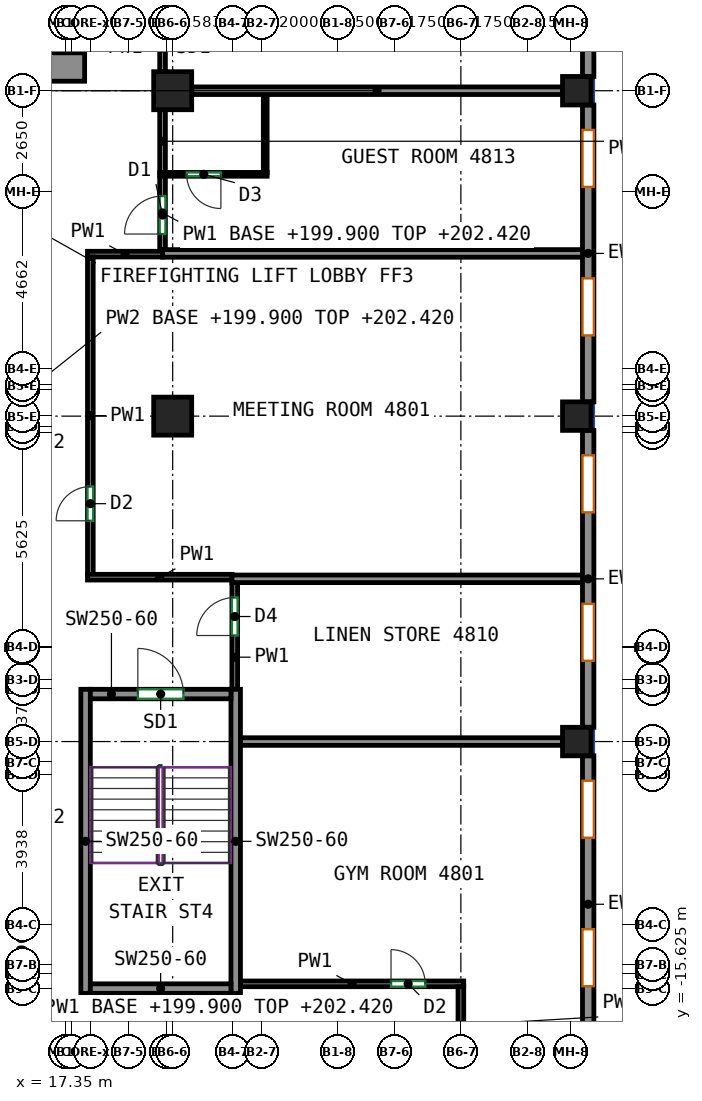
"""IFC4 building model, lengths in metres.
Left out: names, types, materials, properties, quantities, classifications, styles, units other than length and angle.
Written with IfcOpenShell. Run it as: python <this file> out.ifc"""

import sys

from ifc_helpers import new_model, si_unit, direction, frame, frame_2d, origin, origin_2d, place, context, subcontext, project, spatial, rectangle, extrude, source, transform, mapped, element, fill, save


model = new_model("IFC4")
c1 = context("Model", 3, precision=1e-05, world=origin(), true_north=direction((0.0, 1.0)))
c2 = subcontext(c1, "Body", "Model", "MODEL_VIEW")
j1 = project(units=[si_unit("LENGTHUNIT", "METRE"), si_unit("PLANEANGLEUNIT", "RADIAN")], contexts=[c1])
p1 = place(None, origin())
s1 = spatial("IfcSite", under=j1, at=p1, CompositionType="ELEMENT")
p2 = place(p1, origin())
s2 = spatial("IfcBuilding", under=s1, at=p2, CompositionType="ELEMENT")
p3 = place(p2, frame((0.0, 0.0, 199.9)))
s3 = spatial("IfcBuildingStorey", under=s2, at=p3, CompositionType="ELEMENT", Elevation=199.9)
m1 = source(origin(), c2, "Body", "SweptSolid", [
    extrude(rectangle(XDim=1.0, YDim=1.0, at=origin_2d()), origin(), (0.0, 0.0, 1.0), 3.12),
])
for number, where, z_axis, x_axis in (
    (1, (20.167, -0.562, 0.0), (0.0, 0.0, 1.0), (1.0, 0.0, 0.0)),
    (2, (20.167, 8.0, 0.0), (0.0, 0.0, 1.0), (1.0, 0.0, 0.0)),
):
    element("IfcColumn", number, at=place(p3, frame(where, z_axis=z_axis, x_axis=x_axis)), inside=s3, PredefinedType="COLUMN", context=c2, shape_type="MappedRepresentation", body=[
        mapped(m1, transform((0.0, 0.0, 0.0))),
    ])
m2 = source(origin(), c2, "Body", "SweptSolid", [
    extrude(rectangle(XDim=0.75, YDim=0.75, at=origin_2d()), origin(), (0.0, 0.0, 1.0), 3.12),
])
for number, where, z_axis, x_axis in (
    (3, (30.8, -9.125, 0.0), (0.0, 0.0, 1.0), (1.0, 0.0, 0.0)),
    (4, (30.8, -0.562, 0.0), (0.0, 0.0, 1.0), (1.0, 0.0, 0.0)),
    (5, (30.8, 8.0, 0.0), (0.0, 0.0, 1.0), (1.0, 0.0, 0.0)),
):
    element("IfcColumn", number, at=place(p3, frame(where, z_axis=z_axis, x_axis=x_axis)), inside=s3, PredefinedType="COLUMN", context=c2, shape_type="MappedRepresentation", body=[
        mapped(m2, transform((0.0, 0.0, 0.0))),
    ])
m3 = source(origin(), c2, "Body", "SweptSolid", [
    extrude(rectangle(XDim=5.38, YDim=0.75, at=frame_2d((2.69, 0.0))), origin(), (0.0, 0.0, 1.0), 3.12),
])
p4 = place(p3, frame((12.47, 8.625, 0.0), z_axis=(0.0, 0.0, 1.0), x_axis=(1.0, 0.0, 0.0)))
e6 = element("IfcWall", 6, at=p4, inside=s3, PredefinedType="SHEAR", context=c2, shape_type="MappedRepresentation", body=[
    mapped(m3, transform((0.0, 0.0, 0.0))),
])
p5 = place(p4, frame((2.18, 0.0, 0.0)))
e7 = element("IfcOpeningElement", 7, at=p5, cuts=e6, PredefinedType="OPENING", context=c2, shape_type="SweptSolid", body=[
    extrude(rectangle(XDim=1.2, YDim=2.1, at=frame_2d((0.6, 1.05))), frame((0.0, 0.385, 0.0), z_axis=(0.0, -1.0, 0.0), x_axis=(1.0, 0.0, 0.0)), (0.0, 0.0, 1.0), 0.77),
])
m4 = source(origin(), c2, "Body", "SweptSolid", [
    extrude(rectangle(XDim=8.0, YDim=0.25, at=frame_2d((4.0, 0.0))), origin(), (0.0, 0.0, 1.0), 3.12),
])
for number, where, z_axis, x_axis in (
    (8, (17.875, -15.75, 0.0), (0.0, 0.0, 1.0), (0.0, 1.0, 0.0)),
    (9, (21.825, -15.75, 0.0), (0.0, 0.0, 1.0), (0.0, 1.0, 0.0)),
):
    element("IfcWall", number, at=place(p3, frame(where, z_axis=z_axis, x_axis=x_axis)), inside=s3, PredefinedType="SHEAR", context=c2, shape_type="MappedRepresentation", body=[
        mapped(m4, transform((0.0, 0.0, 0.0))),
    ])
m5 = source(origin(), c2, "Body", "SweptSolid", [
    extrude(rectangle(XDim=3.7, YDim=0.25, at=frame_2d((1.85, 0.0))), origin(), (0.0, 0.0, 1.0), 3.12),
])
p6 = place(p3, frame((18.0, -15.625, 0.0), z_axis=(0.0, 0.0, 1.0), x_axis=(1.0, 0.0, 0.0)))
e10 = element("IfcWall", 10, at=p6, inside=s3, PredefinedType="SHEAR", context=c2, shape_type="MappedRepresentation", body=[
    mapped(m5, transform((0.0, 0.0, 0.0))),
])
p7 = place(p3, frame((18.0, -7.875, 0.0), z_axis=(0.0, 0.0, 1.0), x_axis=(1.0, 0.0, 0.0)))
e11 = element("IfcWall", 11, at=p7, inside=s3, PredefinedType="SHEAR", context=c2, shape_type="MappedRepresentation", body=[
    mapped(m5, transform((0.0, 0.0, 0.0))),
])
p8 = place(p7, frame((1.25, 0.0, 0.0)))
e12 = element("IfcOpeningElement", 12, at=p8, cuts=e11, PredefinedType="OPENING", context=c2, shape_type="SweptSolid", body=[
    extrude(rectangle(XDim=1.2, YDim=2.1, at=frame_2d((0.6, 1.05))), frame((0.0, 0.135, 0.0), z_axis=(0.0, -1.0, 0.0), x_axis=(1.0, 0.0, 0.0)), (0.0, 0.0, 1.0), 0.27),
])
m6 = source(origin(), c2, "Body", "SweptSolid", [
    extrude(rectangle(XDim=7.812, YDim=0.3, at=frame_2d((3.906, 0.0))), origin(), (0.0, 0.0, 1.0), 3.12),
])
p9 = place(p3, frame((31.1, -17.312, 0.0), z_axis=(0.0, 0.0, 1.0), x_axis=(0.0, 1.0, 0.0)))
e13 = element("IfcWall", 13, at=p9, inside=s3, PredefinedType="SOLIDWALL", context=c2, shape_type="MappedRepresentation", body=[
    mapped(m6, transform((0.0, 0.0, 0.0))),
])
p10 = place(p9, frame((1.75, 0.0, 0.85)))
e14 = element("IfcOpeningElement", 14, at=p10, cuts=e13, PredefinedType="OPENING", context=c2, shape_type="SweptSolid", body=[
    extrude(rectangle(XDim=1.5, YDim=1.95, at=frame_2d((0.75, 0.975))), frame((0.0, 0.16, 0.0), z_axis=(0.0, -1.0, 0.0), x_axis=(1.0, 0.0, 0.0)), (0.0, 0.0, 1.0), 0.32),
])
p11 = place(p9, frame((5.656, 0.0, 0.85)))
e15 = element("IfcOpeningElement", 15, at=p11, cuts=e13, PredefinedType="OPENING", context=c2, shape_type="SweptSolid", body=[
    extrude(rectangle(XDim=1.5, YDim=1.95, at=frame_2d((0.75, 0.975))), frame((0.0, 0.16, 0.0), z_axis=(0.0, -1.0, 0.0), x_axis=(1.0, 0.0, 0.0)), (0.0, 0.0, 1.0), 0.32),
])
p12 = place(p3, frame((31.1, -8.75, 0.0), z_axis=(0.0, 0.0, 1.0), x_axis=(0.0, 1.0, 0.0)))
e16 = element("IfcWall", 16, at=p12, inside=s3, PredefinedType="SOLIDWALL", context=c2, shape_type="MappedRepresentation", body=[
    mapped(m6, transform((0.0, 0.0, 0.0))),
])
p13 = place(p12, frame((1.75, 0.0, 0.85)))
e17 = element("IfcOpeningElement", 17, at=p13, cuts=e16, PredefinedType="OPENING", context=c2, shape_type="SweptSolid", body=[
    extrude(rectangle(XDim=1.5, YDim=1.95, at=frame_2d((0.75, 0.975))), frame((0.0, 0.16, 0.0), z_axis=(0.0, -1.0, 0.0), x_axis=(1.0, 0.0, 0.0)), (0.0, 0.0, 1.0), 0.32),
])
p14 = place(p12, frame((5.656, 0.0, 0.85)))
e18 = element("IfcOpeningElement", 18, at=p14, cuts=e16, PredefinedType="OPENING", context=c2, shape_type="SweptSolid", body=[
    extrude(rectangle(XDim=1.5, YDim=1.95, at=frame_2d((0.75, 0.975))), frame((0.0, 0.16, 0.0), z_axis=(0.0, -1.0, 0.0), x_axis=(1.0, 0.0, 0.0)), (0.0, 0.0, 1.0), 0.32),
])
p15 = place(p3, frame((31.1, -0.188, 0.0), z_axis=(0.0, 0.0, 1.0), x_axis=(0.0, 1.0, 0.0)))
e19 = element("IfcWall", 19, at=p15, inside=s3, PredefinedType="SOLIDWALL", context=c2, shape_type="MappedRepresentation", body=[
    mapped(m6, transform((0.0, 0.0, 0.0))),
])
p16 = place(p15, frame((1.75, 0.0, 0.85)))
e20 = element("IfcOpeningElement", 20, at=p16, cuts=e19, PredefinedType="OPENING", context=c2, shape_type="SweptSolid", body=[
    extrude(rectangle(XDim=1.5, YDim=1.95, at=frame_2d((0.75, 0.975))), frame((0.0, 0.16, 0.0), z_axis=(0.0, -1.0, 0.0), x_axis=(1.0, 0.0, 0.0)), (0.0, 0.0, 1.0), 0.32),
])
p17 = place(p15, frame((5.656, 0.0, 0.85)))
e21 = element("IfcOpeningElement", 21, at=p17, cuts=e19, PredefinedType="OPENING", context=c2, shape_type="SweptSolid", body=[
    extrude(rectangle(XDim=1.5, YDim=1.95, at=frame_2d((0.75, 0.975))), frame((0.0, 0.16, 0.0), z_axis=(0.0, -1.0, 0.0), x_axis=(1.0, 0.0, 0.0)), (0.0, 0.0, 1.0), 0.32),
])
m7 = source(origin(), c2, "Body", "SweptSolid", [
    extrude(rectangle(XDim=14.0, YDim=0.3, at=frame_2d((7.0, 0.0))), origin(), (0.0, 0.0, 1.0), 3.12),
])
p18 = place(p3, frame((31.1, 8.375, 0.0), z_axis=(0.0, 0.0, 1.0), x_axis=(0.0, 1.0, 0.0)))
e22 = element("IfcWall", 22, at=p18, inside=s3, PredefinedType="SOLIDWALL", context=c2, shape_type="MappedRepresentation", body=[
    mapped(m7, transform((0.0, 0.0, 0.0))),
])
p19 = place(p18, frame((1.75, 0.0, 0.85)))
e23 = element("IfcOpeningElement", 23, at=p19, cuts=e22, PredefinedType="OPENING", context=c2, shape_type="SweptSolid", body=[
    extrude(rectangle(XDim=1.5, YDim=1.95, at=frame_2d((0.75, 0.975))), frame((0.0, 0.16, 0.0), z_axis=(0.0, -1.0, 0.0), x_axis=(1.0, 0.0, 0.0)), (0.0, 0.0, 1.0), 0.32),
])
p20 = place(p18, frame((5.25, 0.0, 0.85)))
e24 = element("IfcOpeningElement", 24, at=p20, cuts=e22, PredefinedType="OPENING", context=c2, shape_type="SweptSolid", body=[
    extrude(rectangle(XDim=1.5, YDim=1.95, at=frame_2d((0.75, 0.975))), frame((0.0, 0.16, 0.0), z_axis=(0.0, -1.0, 0.0), x_axis=(1.0, 0.0, 0.0)), (0.0, 0.0, 1.0), 0.32),
])
p21 = place(p18, frame((8.75, 0.0, 0.85)))
e25 = element("IfcOpeningElement", 25, at=p21, cuts=e22, PredefinedType="OPENING", context=c2, shape_type="SweptSolid", body=[
    extrude(rectangle(XDim=1.5, YDim=1.95, at=frame_2d((0.75, 0.975))), frame((0.0, 0.16, 0.0), z_axis=(0.0, -1.0, 0.0), x_axis=(1.0, 0.0, 0.0)), (0.0, 0.0, 1.0), 0.32),
])
p22 = place(p18, frame((12.25, 0.0, 0.85)))
e26 = element("IfcOpeningElement", 26, at=p22, cuts=e22, PredefinedType="OPENING", context=c2, shape_type="SweptSolid", body=[
    extrude(rectangle(XDim=1.5, YDim=1.95, at=frame_2d((0.75, 0.975))), frame((0.0, 0.16, 0.0), z_axis=(0.0, -1.0, 0.0), x_axis=(1.0, 0.0, 0.0)), (0.0, 0.0, 1.0), 0.32),
])
p23 = place(p3, frame((19.9, 3.809, 0.0), z_axis=(0.0, 0.0, 1.0), x_axis=(0.0, 1.0, 0.0)))
e27 = element("IfcWall", 27, at=p23, inside=s3, PredefinedType="PARTITIONING", context=c2, shape_type="SweptSolid", body=[
    extrude(rectangle(XDim=1.951, YDim=0.15, at=frame_2d((0.976, 0.0))), origin(), (0.0, 0.0, 1.0), 2.52),
])
p24 = place(p23, frame((0.42, 0.0, 0.0)))
e28 = element("IfcOpeningElement", 28, at=p24, cuts=e27, PredefinedType="OPENING", context=c2, shape_type="SweptSolid", body=[
    extrude(rectangle(XDim=1.0, YDim=2.1, at=frame_2d((0.5, 1.05))), frame((0.0, 0.085, 0.0), z_axis=(0.0, -1.0, 0.0), x_axis=(1.0, 0.0, 0.0)), (0.0, 0.0, 1.0), 0.17),
])
p25 = place(p3, frame((19.9, 5.84, 0.0), z_axis=(0.0, 0.0, 1.0), x_axis=(0.0, 1.0, 0.0)))
e29 = element("IfcWall", 29, at=p25, inside=s3, PredefinedType="PARTITIONING", context=c2, shape_type="SweptSolid", body=[
    extrude(rectangle(XDim=1.66, YDim=0.15, at=frame_2d((0.83, 0.0))), origin(), (0.0, 0.0, 1.0), 2.52),
])
p26 = place(p3, frame((19.9, 8.5, 0.0), z_axis=(0.0, 0.0, 1.0), x_axis=(0.0, 1.0, 0.0)))
e30 = element("IfcWall", 30, at=p26, inside=s3, PredefinedType="PARTITIONING", context=c2, shape_type="SweptSolid", body=[
    extrude(rectangle(XDim=1.25, YDim=0.15, at=frame_2d((0.625, 0.0))), origin(), (0.0, 0.0, 1.0), 3.12),
])
p27 = place(p3, frame((17.925, 3.7, 0.0), z_axis=(0.0, 0.0, 1.0), x_axis=(1.0, 0.0, 0.0)))
e31 = element("IfcWall", 31, at=p27, inside=s3, PredefinedType="PARTITIONING", context=c2, shape_type="SweptSolid", body=[
    extrude(rectangle(XDim=1.975, YDim=0.15, at=frame_2d((0.987, 0.0))), origin(), (0.0, 0.0, 1.0), 3.12),
])
p28 = place(p3, frame((18.0, -4.725, 0.0), z_axis=(0.0, 0.0, 1.0), x_axis=(0.0, 1.0, 0.0)))
e32 = element("IfcWall", 32, at=p28, inside=s3, PredefinedType="PARTITIONING", context=c2, shape_type="SweptSolid", body=[
    extrude(rectangle(XDim=8.35, YDim=0.15, at=frame_2d((4.175, 0.0))), origin(), (0.0, 0.0, 1.0), 3.12),
])
p29 = place(p28, frame((1.409, 0.0, 0.0)))
e33 = element("IfcOpeningElement", 33, at=p29, cuts=e32, PredefinedType="OPENING", context=c2, shape_type="SweptSolid", body=[
    extrude(rectangle(XDim=0.9, YDim=2.1, at=frame_2d((0.45, 1.05))), frame((0.0, 0.085, 0.0), z_axis=(0.0, -1.0, 0.0), x_axis=(1.0, 0.0, 0.0)), (0.0, 0.0, 1.0), 0.17),
])
p30 = place(p3, frame((17.925, -4.8, 0.0), z_axis=(0.0, 0.0, 1.0), x_axis=(1.0, 0.0, 0.0)))
e34 = element("IfcWall", 34, at=p30, inside=s3, PredefinedType="PARTITIONING", context=c2, shape_type="SweptSolid", body=[
    extrude(rectangle(XDim=3.802, YDim=0.15, at=frame_2d((1.901, 0.0))), origin(), (0.0, 0.0, 1.0), 3.12),
])
p31 = place(p3, frame((21.8, -7.75, 0.0), z_axis=(0.0, 0.0, 1.0), x_axis=(0.0, 1.0, 0.0)))
e35 = element("IfcWall", 35, at=p31, inside=s3, PredefinedType="PARTITIONING", context=c2, shape_type="SweptSolid", body=[
    extrude(rectangle(XDim=2.817, YDim=0.15, at=frame_2d((1.408, 0.0))), origin(), (0.0, 0.0, 1.0), 3.12),
])
p32 = place(p31, frame((1.415, 0.0, 0.0)))
e36 = element("IfcOpeningElement", 36, at=p32, cuts=e35, PredefinedType="OPENING", context=c2, shape_type="SweptSolid", body=[
    extrude(rectangle(XDim=1.0, YDim=2.1, at=frame_2d((0.5, 1.05))), frame((0.0, 0.085, 0.0), z_axis=(0.0, -1.0, 0.0), x_axis=(1.0, 0.0, 0.0)), (0.0, 0.0, 1.0), 0.17),
])
p33 = place(p3, frame((21.95, -15.5, 0.0), z_axis=(0.0, 0.0, 1.0), x_axis=(1.0, 0.0, 0.0)))
e37 = element("IfcWall", 37, at=p33, inside=s3, PredefinedType="PARTITIONING", context=c2, shape_type="SweptSolid", body=[
    extrude(rectangle(XDim=5.875, YDim=0.15, at=frame_2d((2.938, 0.0))), origin(), (0.0, 0.0, 1.0), 3.12),
])
p34 = place(p33, frame((3.962, 0.0, 0.0)))
e38 = element("IfcOpeningElement", 38, at=p34, cuts=e37, PredefinedType="OPENING", context=c2, shape_type="SweptSolid", body=[
    extrude(rectangle(XDim=0.9, YDim=2.1, at=frame_2d((0.45, 1.05))), frame((0.0, 0.085, 0.0), z_axis=(0.0, -1.0, 0.0), x_axis=(1.0, 0.0, 0.0)), (0.0, 0.0, 1.0), 0.17),
])
p35 = place(p3, frame((27.75, -17.598, 0.0), z_axis=(0.0, 0.0, 1.0), x_axis=(0.0, 1.0, 0.0)))
e39 = element("IfcWall", 39, at=p35, inside=s3, PredefinedType="PARTITIONING", context=c2, shape_type="SweptSolid", body=[
    extrude(rectangle(XDim=2.023, YDim=0.15, at=frame_2d((1.011, 0.0))), origin(), (0.0, 0.0, 1.0), 2.52),
])
p36 = place(p3, frame((22.652, 5.8, 0.0), z_axis=(0.0, 0.0, 1.0), x_axis=(-1.0, 0.0, 0.0)))
e40 = element("IfcWall", 40, at=p36, inside=s3, PredefinedType="PARTITIONING", context=c2, shape_type="SweptSolid", body=[
    extrude(rectangle(XDim=2.825, YDim=0.1, at=frame_2d((1.413, 0.0))), origin(), (0.0, 0.0, 1.0), 3.12),
])
p37 = place(p36, frame((1.217, 0.0, 0.0)))
e41 = element("IfcOpeningElement", 41, at=p37, cuts=e40, PredefinedType="OPENING", context=c2, shape_type="SweptSolid", body=[
    extrude(rectangle(XDim=0.9, YDim=2.1, at=frame_2d((0.45, 1.05))), frame((0.0, 0.06, 0.0), z_axis=(0.0, -1.0, 0.0), x_axis=(1.0, 0.0, 0.0)), (0.0, 0.0, 1.0), 0.12),
])
p38 = place(p3, frame((22.602, 5.85, 0.0), z_axis=(0.0, 0.0, 1.0), x_axis=(0.0, 1.0, 0.0)))
e42 = element("IfcWall", 42, at=p38, inside=s3, PredefinedType="PARTITIONING", context=c2, shape_type="SweptSolid", body=[
    extrude(rectangle(XDim=2.05, YDim=0.1, at=frame_2d((1.025, 0.0))), origin(), (0.0, 0.0, 1.0), 3.12),
])
p39 = place(p3, frame((19.902, 3.719, 0.0), z_axis=(0.0, 0.0, 1.0), x_axis=(1.0, 0.0, 0.0)))
e43 = element("IfcWall", 43, at=p39, inside=s3, PredefinedType="PARTITIONING", context=c2, shape_type="SweptSolid", body=[
    extrude(rectangle(XDim=11.098, YDim=0.2, at=frame_2d((5.549, 0.0))), origin(), (0.0, 0.0, 1.0), 3.12),
])
p40 = place(p3, frame((20.667, 8.0, 0.0), z_axis=(0.0, 0.0, 1.0), x_axis=(1.0, 0.0, 0.0)))
e44 = element("IfcWall", 44, at=p40, inside=s3, PredefinedType="PARTITIONING", context=c2, shape_type="SweptSolid", body=[
    extrude(rectangle(XDim=9.758, YDim=0.2, at=frame_2d((4.879, 0.0))), origin(), (0.0, 0.0, 1.0), 2.52),
])
p41 = place(p3, frame((21.727, -4.843, 0.0), z_axis=(0.0, 0.0, 1.0), x_axis=(1.0, 0.0, 0.0)))
e45 = element("IfcWall", 45, at=p41, inside=s3, PredefinedType="PARTITIONING", context=c2, shape_type="SweptSolid", body=[
    extrude(rectangle(XDim=9.273, YDim=0.2, at=frame_2d((4.636, 0.0))), origin(), (0.0, 0.0, 1.0), 3.12),
])
p42 = place(p3, frame((21.95, -9.125, 0.0), z_axis=(0.0, 0.0, 1.0), x_axis=(1.0, 0.0, 0.0)))
e46 = element("IfcWall", 46, at=p42, inside=s3, PredefinedType="PARTITIONING", context=c2, shape_type="SweptSolid", body=[
    extrude(rectangle(XDim=8.475, YDim=0.2, at=frame_2d((4.238, 0.0))), origin(), (0.0, 0.0, 1.0), 3.12),
])
p43 = place(p10, origin())
e47 = element("IfcWindow", 47, at=p43, inside=s3, PartitioningType="SINGLE_PANEL", PredefinedType="WINDOW", context=c2, shape_type="SweptSolid", body=[
    extrude(rectangle(XDim=1.5, YDim=1.95, at=frame_2d((0.75, 0.975))), frame((0.0, 0.03, 0.0), z_axis=(0.0, -1.0, 0.0), x_axis=(1.0, 0.0, 0.0)), (0.0, 0.0, 1.0), 0.06),
])
fill(e14, e47)
p44 = place(p11, origin())
e48 = element("IfcWindow", 48, at=p44, inside=s3, PartitioningType="SINGLE_PANEL", PredefinedType="WINDOW", context=c2, shape_type="SweptSolid", body=[
    extrude(rectangle(XDim=1.5, YDim=1.95, at=frame_2d((0.75, 0.975))), frame((0.0, 0.03, 0.0), z_axis=(0.0, -1.0, 0.0), x_axis=(1.0, 0.0, 0.0)), (0.0, 0.0, 1.0), 0.06),
])
fill(e15, e48)
p45 = place(p13, origin())
e49 = element("IfcWindow", 49, at=p45, inside=s3, PartitioningType="SINGLE_PANEL", PredefinedType="WINDOW", context=c2, shape_type="SweptSolid", body=[
    extrude(rectangle(XDim=1.5, YDim=1.95, at=frame_2d((0.75, 0.975))), frame((0.0, 0.03, 0.0), z_axis=(0.0, -1.0, 0.0), x_axis=(1.0, 0.0, 0.0)), (0.0, 0.0, 1.0), 0.06),
])
fill(e17, e49)
p46 = place(p14, origin())
e50 = element("IfcWindow", 50, at=p46, inside=s3, PartitioningType="SINGLE_PANEL", PredefinedType="WINDOW", context=c2, shape_type="SweptSolid", body=[
    extrude(rectangle(XDim=1.5, YDim=1.95, at=frame_2d((0.75, 0.975))), frame((0.0, 0.03, 0.0), z_axis=(0.0, -1.0, 0.0), x_axis=(1.0, 0.0, 0.0)), (0.0, 0.0, 1.0), 0.06),
])
fill(e18, e50)
p47 = place(p16, origin())
e51 = element("IfcWindow", 51, at=p47, inside=s3, PartitioningType="SINGLE_PANEL", PredefinedType="WINDOW", context=c2, shape_type="SweptSolid", body=[
    extrude(rectangle(XDim=1.5, YDim=1.95, at=frame_2d((0.75, 0.975))), frame((0.0, 0.03, 0.0), z_axis=(0.0, -1.0, 0.0), x_axis=(1.0, 0.0, 0.0)), (0.0, 0.0, 1.0), 0.06),
])
fill(e20, e51)
p48 = place(p17, origin())
e52 = element("IfcWindow", 52, at=p48, inside=s3, PartitioningType="SINGLE_PANEL", PredefinedType="WINDOW", context=c2, shape_type="SweptSolid", body=[
    extrude(rectangle(XDim=1.5, YDim=1.95, at=frame_2d((0.75, 0.975))), frame((0.0, 0.03, 0.0), z_axis=(0.0, -1.0, 0.0), x_axis=(1.0, 0.0, 0.0)), (0.0, 0.0, 1.0), 0.06),
])
fill(e21, e52)
p49 = place(p8, origin())
e53 = element("IfcDoor", 53, at=p49, inside=s3, OperationType="DOUBLE_DOOR_SINGLE_SWING", PredefinedType="DOOR", context=c2, shape_type="SweptSolid", body=[
    extrude(rectangle(XDim=1.2, YDim=2.1, at=frame_2d((0.6, 1.05))), frame((0.0, 0.025, 0.0), z_axis=(0.0, -1.0, 0.0), x_axis=(1.0, 0.0, 0.0)), (0.0, 0.0, 1.0), 0.05),
])
fill(e12, e53)
p50 = place(p34, origin())
e54 = element("IfcDoor", 54, at=p50, inside=s3, OperationType="SINGLE_SWING_LEFT", PredefinedType="DOOR", context=c2, shape_type="SweptSolid", body=[
    extrude(rectangle(XDim=0.9, YDim=2.1, at=frame_2d((0.45, 1.05))), frame((0.0, 0.025, 0.0), z_axis=(0.0, -1.0, 0.0), x_axis=(1.0, 0.0, 0.0)), (0.0, 0.0, 1.0), 0.05),
])
fill(e38, e54)
p51 = place(p32, origin())
e55 = element("IfcDoor", 55, at=p51, inside=s3, OperationType="SINGLE_SWING_LEFT", PredefinedType="DOOR", context=c2, shape_type="SweptSolid", body=[
    extrude(rectangle(XDim=1.0, YDim=2.1, at=frame_2d((0.5, 1.05))), frame((0.0, 0.025, 0.0), z_axis=(0.0, -1.0, 0.0), x_axis=(1.0, 0.0, 0.0)), (0.0, 0.0, 1.0), 0.05),
])
fill(e36, e55)
p52 = place(p29, origin())
e56 = element("IfcDoor", 56, at=p52, inside=s3, OperationType="SINGLE_SWING_LEFT", PredefinedType="DOOR", context=c2, shape_type="SweptSolid", body=[
    extrude(rectangle(XDim=0.9, YDim=2.1, at=frame_2d((0.45, 1.05))), frame((0.0, 0.025, 0.0), z_axis=(0.0, -1.0, 0.0), x_axis=(1.0, 0.0, 0.0)), (0.0, 0.0, 1.0), 0.05),
])
fill(e33, e56)
p53 = place(p24, origin())
e57 = element("IfcDoor", 57, at=p53, inside=s3, OperationType="SINGLE_SWING_LEFT", PredefinedType="DOOR", context=c2, shape_type="SweptSolid", body=[
    extrude(rectangle(XDim=1.0, YDim=2.1, at=frame_2d((0.5, 1.05))), frame((0.0, 0.025, 0.0), z_axis=(0.0, -1.0, 0.0), x_axis=(1.0, 0.0, 0.0)), (0.0, 0.0, 1.0), 0.05),
])
fill(e28, e57)
p54 = place(p37, origin())
e58 = element("IfcDoor", 58, at=p54, inside=s3, OperationType="SINGLE_SWING_LEFT", PredefinedType="DOOR", context=c2, shape_type="SweptSolid", body=[
    extrude(rectangle(XDim=0.9, YDim=2.1, at=frame_2d((0.45, 1.05))), frame((0.0, 0.025, 0.0), z_axis=(0.0, -1.0, 0.0), x_axis=(1.0, 0.0, 0.0)), (0.0, 0.0, 1.0), 0.05),
])
fill(e41, e58)
save(model, sys.argv[1])
